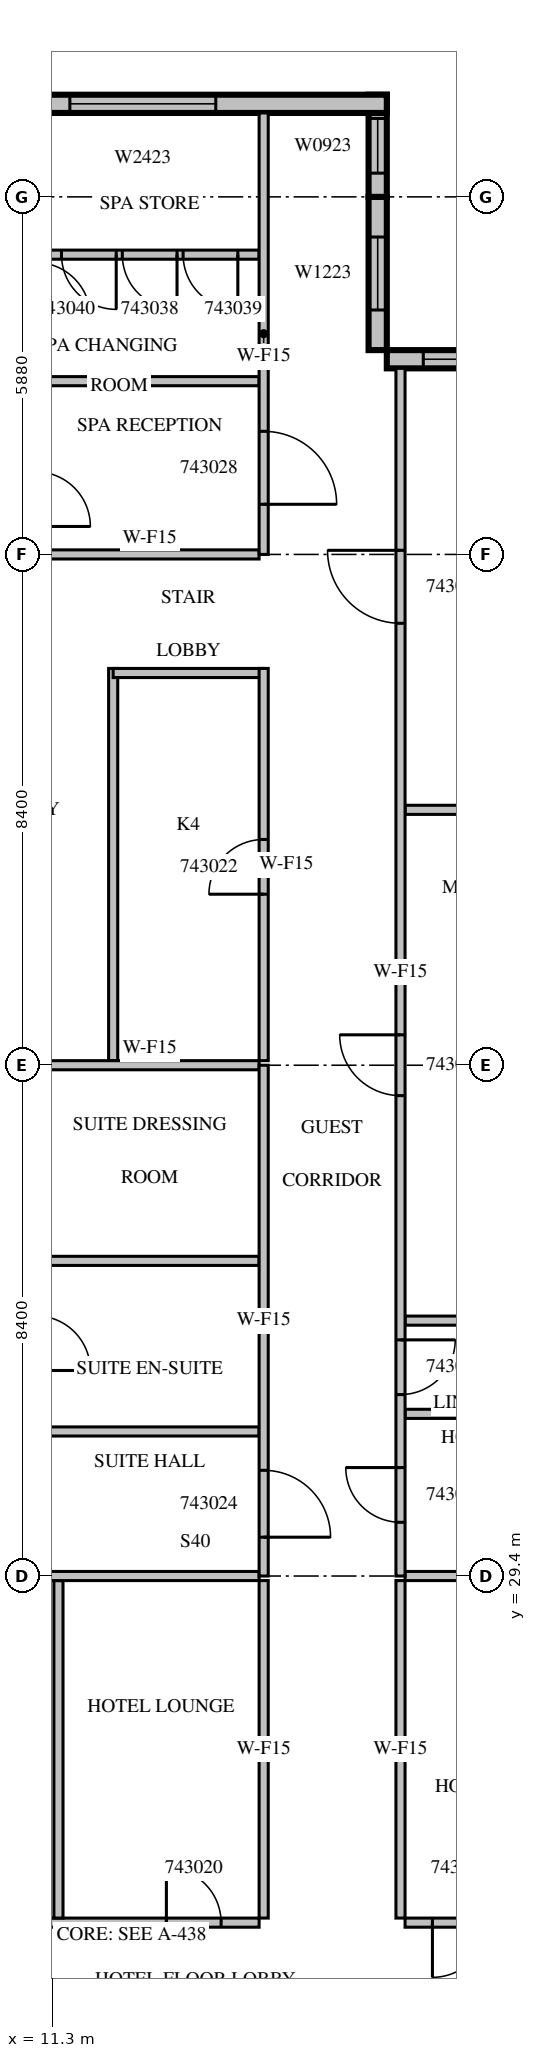
"""IFC4 building model, lengths in metres.
Left out: names, types, materials, properties, quantities, classifications, styles, units other than length and angle.
Written with IfcOpenShell. Run it as: python <this file> out.ifc"""

import sys

from ifc_helpers import new_model, si_unit, direction, frame, frame_2d, origin, place, context, subcontext, project, spatial, rectangle, extrude, source, transform, mapped, element, fill, save


model = new_model("IFC4")
c1 = context("Model", 3, precision=1e-05, world=origin(), true_north=direction((0.0, 1.0)))
c2 = subcontext(c1, "Body", "Model", "MODEL_VIEW")
j1 = project(units=[si_unit("LENGTHUNIT", "METRE"), si_unit("PLANEANGLEUNIT", "RADIAN")], contexts=[c1])
p1 = place(None, origin())
s1 = spatial("IfcSite", under=j1, at=p1, CompositionType="ELEMENT")
p2 = place(p1, origin())
s2 = spatial("IfcBuilding", under=s1, at=p2, CompositionType="ELEMENT")
p3 = place(p2, frame((0.0, 0.0, 196.8)))
s3 = spatial("IfcBuildingStorey", under=s2, at=p3, CompositionType="ELEMENT", Elevation=196.8)
m1 = source(origin(), c2, "Body", "SweptSolid", [
    extrude(rectangle(XDim=4.2, YDim=0.3, at=frame_2d((2.1, 0.0))), origin(), (0.0, 0.0, 1.0), 3.4),
])
p4 = place(p3, frame((21.0, 49.41, 0.0), z_axis=(0.0, 0.0, 1.0), x_axis=(-1.0, 0.0, 0.0)))
e1 = element("IfcWall", 1, at=p4, inside=s3, PredefinedType="STANDARD", context=c2, shape_type="MappedRepresentation", body=[
    mapped(m1, transform((0.0, 0.0, 0.0), scale=1.0)),
])
m2 = source(origin(), c2, "Body", "SweptSolid", [
    extrude(rectangle(XDim=3.0, YDim=2.3, at=frame_2d((1.5, 1.15))), frame((0.0, 0.16, 0.0), z_axis=(0.0, -1.0, 0.0), x_axis=(1.0, 0.0, 0.0)), (0.0, 0.0, 1.0), 0.32),
])
p5 = place(p4, frame((0.6, 0.0, 0.6)))
e2 = element("IfcOpeningElement", 2, at=p5, cuts=e1, PredefinedType="OPENING", context=c2, shape_type="MappedRepresentation", body=[
    mapped(m2, transform((0.0, 0.0, 0.0), scale=1.0)),
])
m3 = source(origin(), c2, "Body", "SweptSolid", [
    extrude(rectangle(XDim=2.52, YDim=0.3, at=frame_2d((1.26, 0.0))), origin(), (0.0, 0.0, 1.0), 3.4),
])
p6 = place(p3, frame((16.65, 49.56, 0.0), z_axis=(0.0, 0.0, 1.0), x_axis=(0.0, 1.0, 0.0)))
e3 = element("IfcWall", 3, at=p6, inside=s3, PredefinedType="STANDARD", context=c2, shape_type="MappedRepresentation", body=[
    mapped(m3, transform((0.0, 0.0, 0.0), scale=1.0)),
])
m4 = source(origin(), c2, "Body", "SweptSolid", [
    extrude(rectangle(XDim=1.2, YDim=2.3, at=frame_2d((0.6, 1.15))), frame((0.0, 0.16, 0.0), z_axis=(0.0, -1.0, 0.0), x_axis=(1.0, 0.0, 0.0)), (0.0, 0.0, 1.0), 0.32),
])
p7 = place(p6, frame((0.66, 0.0, 0.6)))
e4 = element("IfcOpeningElement", 4, at=p7, cuts=e3, PredefinedType="OPENING", context=c2, shape_type="MappedRepresentation", body=[
    mapped(m4, transform((0.0, 0.0, 0.0), scale=1.0)),
])
m5 = source(origin(), c2, "Body", "SweptSolid", [
    extrude(rectangle(XDim=1.68, YDim=0.3, at=frame_2d((0.84, 0.0))), origin(), (0.0, 0.0, 1.0), 3.4),
])
p8 = place(p3, frame((16.65, 52.08, 0.0), z_axis=(0.0, 0.0, 1.0), x_axis=(0.0, 1.0, 0.0)))
e5 = element("IfcWall", 5, at=p8, inside=s3, PredefinedType="STANDARD", context=c2, shape_type="MappedRepresentation", body=[
    mapped(m5, transform((0.0, 0.0, 0.0), scale=1.0)),
])
m6 = source(origin(), c2, "Body", "SweptSolid", [
    extrude(rectangle(XDim=0.9, YDim=2.3, at=frame_2d((0.45, 1.15))), frame((0.0, 0.16, 0.0), z_axis=(0.0, -1.0, 0.0), x_axis=(1.0, 0.0, 0.0)), (0.0, 0.0, 1.0), 0.32),
])
p9 = place(p8, frame((0.39, 0.0, 0.6)))
e6 = element("IfcOpeningElement", 6, at=p9, cuts=e5, PredefinedType="OPENING", context=c2, shape_type="MappedRepresentation", body=[
    mapped(m6, transform((0.0, 0.0, 0.0), scale=1.0)),
])
m7 = source(origin(), c2, "Body", "SweptSolid", [
    extrude(rectangle(XDim=10.5, YDim=0.3, at=frame_2d((5.25, 0.0))), origin(), (0.0, 0.0, 1.0), 3.4),
])
p10 = place(p3, frame((16.8, 53.61, 0.0), z_axis=(0.0, 0.0, 1.0), x_axis=(-1.0, 0.0, 0.0)))
e7 = element("IfcWall", 7, at=p10, inside=s3, PredefinedType="STANDARD", context=c2, shape_type="MappedRepresentation", body=[
    mapped(m7, transform((0.0, 0.0, 0.0), scale=1.0)),
])
m8 = source(origin(), c2, "Body", "SweptSolid", [
    extrude(rectangle(XDim=1.8, YDim=2.3, at=frame_2d((0.9, 1.15))), frame((0.0, 0.16, 0.0), z_axis=(0.0, -1.0, 0.0), x_axis=(1.0, 0.0, 0.0)), (0.0, 0.0, 1.0), 0.32),
])
p11 = place(p10, frame((8.025, 0.0, 0.6)))
e8 = element("IfcOpeningElement", 8, at=p11, cuts=e7, PredefinedType="OPENING", context=c2, shape_type="MappedRepresentation", body=[
    mapped(m8, transform((0.0, 0.0, 0.0), scale=1.0)),
])
m9 = source(origin(), c2, "Body", "SweptSolid", [
    extrude(rectangle(XDim=2.4, YDim=2.3, at=frame_2d((1.2, 1.15))), frame((0.0, 0.16, 0.0), z_axis=(0.0, -1.0, 0.0), x_axis=(1.0, 0.0, 0.0)), (0.0, 0.0, 1.0), 0.32),
])
p12 = place(p10, frame((2.812, 0.0, 0.6)))
e9 = element("IfcOpeningElement", 9, at=p12, cuts=e7, PredefinedType="OPENING", context=c2, shape_type="MappedRepresentation", body=[
    mapped(m9, transform((0.0, 0.0, 0.0), scale=1.0)),
])
p13 = place(p3, frame((6.505, 23.7, 0.0), z_axis=(0.0, 0.0, 1.0), x_axis=(1.0, 0.0, 0.0)))
e10 = element("IfcWall", 10, at=p13, inside=s3, PredefinedType="PARTITIONING", context=c2, shape_type="SweptSolid", body=[
    extrude(rectangle(XDim=8.195, YDim=0.15, at=frame_2d((4.098, 0.0))), origin(), (0.0, 0.0, 1.0), 3.4),
])
m10 = source(origin(), c2, "Body", "SweptSolid", [
    extrude(rectangle(XDim=0.9, YDim=2.1, at=frame_2d((0.45, 1.05))), frame((0.0, 0.085, 0.0), z_axis=(0.0, -1.0, 0.0), x_axis=(1.0, 0.0, 0.0)), (0.0, 0.0, 1.0), 0.17),
])
p14 = place(p13, frame((1.745, 0.0, 0.0)))
e11 = element("IfcOpeningElement", 11, at=p14, cuts=e10, PredefinedType="OPENING", context=c2, shape_type="MappedRepresentation", body=[
    mapped(m10, transform((0.0, 0.0, 0.0), scale=1.0)),
])
p15 = place(p13, frame((6.67, 0.0, 0.0)))
e12 = element("IfcOpeningElement", 12, at=p15, cuts=e10, PredefinedType="OPENING", context=c2, shape_type="MappedRepresentation", body=[
    mapped(m10, transform((0.0, 0.0, 0.0), scale=1.0)),
])
m11 = source(origin(), c2, "Body", "SweptSolid", [
    extrude(rectangle(XDim=3.6, YDim=0.15, at=frame_2d((1.8, 0.0))), origin(), (0.0, 0.0, 1.0), 3.4),
])
p16 = place(p3, frame((17.1, 23.7, 0.0), z_axis=(0.0, 0.0, 1.0), x_axis=(1.0, 0.0, 0.0)))
e13 = element("IfcWall", 13, at=p16, inside=s3, PredefinedType="PARTITIONING", context=c2, shape_type="MappedRepresentation", body=[
    mapped(m11, transform((0.0, 0.0, 0.0), scale=1.0)),
])
p17 = place(p16, frame((0.45, 0.0, 0.0)))
e14 = element("IfcOpeningElement", 14, at=p17, cuts=e13, PredefinedType="OPENING", context=c2, shape_type="MappedRepresentation", body=[
    mapped(m10, transform((0.0, 0.0, 0.0), scale=1.0)),
])
m12 = source(origin(), c2, "Body", "SweptSolid", [
    extrude(rectangle(XDim=5.55, YDim=0.15, at=frame_2d((2.775, 0.0))), origin(), (0.0, 0.0, 1.0), 3.4),
])
for number, where, z_axis, x_axis in (
    (15, (11.4, 23.775, 0.0), (0.0, 0.0, 1.0), (0.0, 1.0, 0.0)),
    (16, (14.775, 23.775, 0.0), (0.0, 0.0, 1.0), (0.0, 1.0, 0.0)),
    (17, (17.025, 29.325, 0.0), (0.0, 0.0, 1.0), (0.0, -1.0, 0.0)),
):
    element("IfcWall", number, at=place(p3, frame(where, z_axis=z_axis, x_axis=x_axis)), inside=s3, PredefinedType="PARTITIONING", context=c2, shape_type="MappedRepresentation", body=[
        mapped(m12, transform((0.0, 0.0, 0.0), scale=1.0)),
    ])
m13 = source(origin(), c2, "Body", "SweptSolid", [
    extrude(rectangle(XDim=3.751, YDim=0.15, at=frame_2d((1.875, 0.0))), origin(), (0.0, 0.0, 1.0), 3.4),
])
p18 = place(p3, frame((14.7, 29.4, 0.0), z_axis=(0.0, 0.0, 1.0), x_axis=(-1.0, 0.0, 0.0)))
e18 = element("IfcWall", 18, at=p18, inside=s3, PredefinedType="PARTITIONING", context=c2, shape_type="MappedRepresentation", body=[
    mapped(m13, transform((0.0, 0.0, 0.0), scale=1.0)),
])
m14 = source(origin(), c2, "Body", "SweptSolid", [
    extrude(rectangle(XDim=3.001, YDim=0.15, at=frame_2d((1.5, 0.0))), origin(), (0.0, 0.0, 1.0), 3.4),
])
p19 = place(p3, frame((20.101, 29.4, 0.0), z_axis=(0.0, 0.0, 1.0), x_axis=(-1.0, 0.0, 0.0)))
e19 = element("IfcWall", 19, at=p19, inside=s3, PredefinedType="PARTITIONING", context=c2, shape_type="MappedRepresentation", body=[
    mapped(m14, transform((0.0, 0.0, 0.0), scale=1.0)),
])
m15 = source(origin(), c2, "Body", "SweptSolid", [
    extrude(rectangle(XDim=6.45, YDim=0.15, at=frame_2d((3.225, 0.0))), origin(), (0.0, 0.0, 1.0), 3.4),
])
p20 = place(p3, frame((12.3, 44.325, 0.0), z_axis=(0.0, 0.0, 1.0), x_axis=(0.0, -1.0, 0.0)))
e20 = element("IfcWall", 20, at=p20, inside=s3, PredefinedType="PARTITIONING", context=c2, shape_type="MappedRepresentation", body=[
    mapped(m15, transform((0.0, 0.0, 0.0), scale=1.0)),
])
m16 = source(origin(), c2, "Body", "SweptSolid", [
    extrude(rectangle(XDim=2.475, YDim=0.15, at=frame_2d((1.238, 0.0))), origin(), (0.0, 0.0, 1.0), 3.4),
])
p21 = place(p3, frame((14.775, 44.25, 0.0), z_axis=(0.0, 0.0, 1.0), x_axis=(-1.0, 0.0, 0.0)))
e21 = element("IfcWall", 21, at=p21, inside=s3, PredefinedType="PARTITIONING", context=c2, shape_type="MappedRepresentation", body=[
    mapped(m16, transform((0.0, 0.0, 0.0), scale=1.0)),
])
p22 = place(p3, frame((14.775, 37.875, 0.0), z_axis=(0.0, 0.0, 1.0), x_axis=(0.0, 1.0, 0.0)))
e22 = element("IfcWall", 22, at=p22, inside=s3, PredefinedType="PARTITIONING", context=c2, shape_type="MappedRepresentation", body=[
    mapped(m15, transform((0.0, 0.0, 0.0), scale=1.0)),
])
p23 = place(p22, frame((2.737, 0.0, 0.0)))
e23 = element("IfcOpeningElement", 23, at=p23, cuts=e22, PredefinedType="OPENING", context=c2, shape_type="MappedRepresentation", body=[
    mapped(m10, transform((0.0, 0.0, 0.0), scale=1.0)),
])
for number, where, z_axis, x_axis in (
    (24, (14.7, 31.777, 0.0), (0.0, 0.0, 1.0), (-1.0, 0.0, 0.0)),
    (25, (14.7, 34.583, 0.0), (0.0, 0.0, 1.0), (-1.0, 0.0, 0.0)),
    (26, (14.7, 37.8, 0.0), (0.0, 0.0, 1.0), (-1.0, 0.0, 0.0)),
    (27, (14.7, 49.049, 0.0), (0.0, 0.0, 1.0), (-1.0, 0.0, 0.0)),
):
    element("IfcWall", number, at=place(p3, frame(where, z_axis=z_axis, x_axis=x_axis)), inside=s3, PredefinedType="PARTITIONING", context=c2, shape_type="MappedRepresentation", body=[
        mapped(m11, transform((0.0, 0.0, 0.0), scale=1.0)),
    ])
p24 = place(p3, frame((14.7, 51.13, 0.0), z_axis=(0.0, 0.0, 1.0), x_axis=(-1.0, 0.0, 0.0)))
e28 = element("IfcWall", 28, at=p24, inside=s3, PredefinedType="PARTITIONING", context=c2, shape_type="MappedRepresentation", body=[
    mapped(m11, transform((0.0, 0.0, 0.0), scale=1.0)),
])
p25 = place(p24, frame((1.35, 0.0, 0.0)))
e29 = element("IfcOpeningElement", 29, at=p25, cuts=e28, PredefinedType="OPENING", context=c2, shape_type="MappedRepresentation", body=[
    mapped(m10, transform((0.0, 0.0, 0.0), scale=1.0)),
])
p26 = place(p24, frame((0.35, 0.0, 0.0)))
e30 = element("IfcOpeningElement", 30, at=p26, cuts=e28, PredefinedType="OPENING", context=c2, shape_type="MappedRepresentation", body=[
    mapped(m10, transform((0.0, 0.0, 0.0), scale=1.0)),
])
p27 = place(p24, frame((2.35, 0.0, 0.0)))
e31 = element("IfcOpeningElement", 31, at=p27, cuts=e28, PredefinedType="OPENING", context=c2, shape_type="MappedRepresentation", body=[
    mapped(m10, transform((0.0, 0.0, 0.0), scale=1.0)),
])
for number, where, z_axis, x_axis in (
    (32, (14.7, 46.2, 0.0), (0.0, 0.0, 1.0), (-1.0, 0.0, 0.0)),
    (33, (17.1, 32.067, 0.0), (0.0, 0.0, 1.0), (1.0, 0.0, 0.0)),
    (34, (20.7, 33.6, 0.0), (0.0, 0.0, 1.0), (-1.0, 0.0, 0.0)),
    (35, (20.7, 42.0, 0.0), (0.0, 0.0, 1.0), (-1.0, 0.0, 0.0)),
):
    element("IfcWall", number, at=place(p3, frame(where, z_axis=z_axis, x_axis=x_axis)), inside=s3, PredefinedType="PARTITIONING", context=c2, shape_type="MappedRepresentation", body=[
        mapped(m11, transform((0.0, 0.0, 0.0), scale=1.0)),
    ])
m17 = source(origin(), c2, "Body", "SweptSolid", [
    extrude(rectangle(XDim=8.4, YDim=0.15, at=frame_2d((4.2, 0.0))), origin(), (0.0, 0.0, 1.0), 3.4),
])
p28 = place(p3, frame((14.775, 29.4, 0.0), z_axis=(0.0, 0.0, 1.0), x_axis=(0.0, 1.0, 0.0)))
e36 = element("IfcWall", 36, at=p28, inside=s3, PredefinedType="PARTITIONING", context=c2, shape_type="MappedRepresentation", body=[
    mapped(m17, transform((0.0, 0.0, 0.0), scale=1.0)),
])
m18 = source(origin(), c2, "Body", "SweptSolid", [
    extrude(rectangle(XDim=1.1, YDim=2.1, at=frame_2d((0.55, 1.05))), frame((0.0, 0.085, 0.0), z_axis=(0.0, -1.0, 0.0), x_axis=(1.0, 0.0, 0.0)), (0.0, 0.0, 1.0), 0.17),
])
p29 = place(p28, frame((0.638, 0.0, 0.0)))
e37 = element("IfcOpeningElement", 37, at=p29, cuts=e36, PredefinedType="OPENING", context=c2, shape_type="MappedRepresentation", body=[
    mapped(m18, transform((0.0, 0.0, 0.0), scale=1.0)),
])
m19 = source(origin(), c2, "Body", "SweptSolid", [
    extrude(rectangle(XDim=7.26, YDim=0.15, at=frame_2d((3.63, 0.0))), origin(), (0.0, 0.0, 1.0), 3.4),
])
p30 = place(p3, frame((14.775, 46.2, 0.0), z_axis=(0.0, 0.0, 1.0), x_axis=(0.0, 1.0, 0.0)))
e38 = element("IfcWall", 38, at=p30, inside=s3, PredefinedType="PARTITIONING", context=c2, shape_type="MappedRepresentation", body=[
    mapped(m19, transform((0.0, 0.0, 0.0), scale=1.0)),
])
m20 = source(origin(), c2, "Body", "SweptSolid", [
    extrude(rectangle(XDim=1.2, YDim=2.1, at=frame_2d((0.6, 1.05))), frame((0.0, 0.085, 0.0), z_axis=(0.0, -1.0, 0.0), x_axis=(1.0, 0.0, 0.0)), (0.0, 0.0, 1.0), 0.17),
])
p31 = place(p30, frame((0.825, 0.0, 0.0)))
e39 = element("IfcOpeningElement", 39, at=p31, cuts=e38, PredefinedType="OPENING", context=c2, shape_type="MappedRepresentation", body=[
    mapped(m20, transform((0.0, 0.0, 0.0), scale=1.0)),
])
m21 = source(origin(), c2, "Body", "SweptSolid", [
    extrude(rectangle(XDim=19.86, YDim=0.15, at=frame_2d((9.93, 0.0))), origin(), (0.0, 0.0, 1.0), 3.4),
])
p32 = place(p3, frame((17.025, 49.26, 0.0), z_axis=(0.0, 0.0, 1.0), x_axis=(0.0, -1.0, 0.0)))
e40 = element("IfcWall", 40, at=p32, inside=s3, PredefinedType="PARTITIONING", context=c2, shape_type="MappedRepresentation", body=[
    mapped(m21, transform((0.0, 0.0, 0.0), scale=1.0)),
])
p33 = place(p32, frame((18.076, 0.0, 0.0)))
e41 = element("IfcOpeningElement", 41, at=p33, cuts=e40, PredefinedType="OPENING", context=c2, shape_type="MappedRepresentation", body=[
    mapped(m10, transform((0.0, 0.0, 0.0), scale=1.0)),
])
p34 = place(p32, frame((15.976, 0.0, 0.0)))
e42 = element("IfcOpeningElement", 42, at=p34, cuts=e40, PredefinedType="OPENING", context=c2, shape_type="MappedRepresentation", body=[
    mapped(m10, transform((0.0, 0.0, 0.0), scale=1.0)),
])
m22 = source(origin(), c2, "Body", "SweptSolid", [
    extrude(rectangle(XDim=1.0, YDim=2.1, at=frame_2d((0.5, 1.05))), frame((0.0, 0.085, 0.0), z_axis=(0.0, -1.0, 0.0), x_axis=(1.0, 0.0, 0.0)), (0.0, 0.0, 1.0), 0.17),
])
p35 = place(p32, frame((10.96, 0.0, 0.0)))
e43 = element("IfcOpeningElement", 43, at=p35, cuts=e40, PredefinedType="OPENING", context=c2, shape_type="MappedRepresentation", body=[
    mapped(m22, transform((0.0, 0.0, 0.0), scale=1.0)),
])
p36 = place(p32, frame((2.993, 0.0, 0.0)))
e44 = element("IfcOpeningElement", 44, at=p36, cuts=e40, PredefinedType="OPENING", context=c2, shape_type="MappedRepresentation", body=[
    mapped(m20, transform((0.0, 0.0, 0.0), scale=1.0)),
])
m23 = source(origin(), c2, "Body", "SweptSolid", [
    extrude(rectangle(XDim=3.0, YDim=2.3, at=frame_2d((1.5, 1.15))), frame((0.0, 0.03, 0.0), z_axis=(0.0, -1.0, 0.0), x_axis=(1.0, 0.0, 0.0)), (0.0, 0.0, 1.0), 0.06),
])
p37 = place(p5, origin())
e45 = element("IfcWindow", 45, at=p37, inside=s3, PartitioningType="SINGLE_PANEL", PredefinedType="WINDOW", context=c2, shape_type="MappedRepresentation", body=[
    mapped(m23, transform((0.0, 0.0, 0.0), scale=1.0)),
])
fill(e2, e45)
m24 = source(origin(), c2, "Body", "SweptSolid", [
    extrude(rectangle(XDim=1.2, YDim=2.3, at=frame_2d((0.6, 1.15))), frame((0.0, 0.03, 0.0), z_axis=(0.0, -1.0, 0.0), x_axis=(1.0, 0.0, 0.0)), (0.0, 0.0, 1.0), 0.06),
])
p38 = place(p7, origin())
e46 = element("IfcWindow", 46, at=p38, inside=s3, PartitioningType="SINGLE_PANEL", PredefinedType="WINDOW", context=c2, shape_type="MappedRepresentation", body=[
    mapped(m24, transform((0.0, 0.0, 0.0), scale=1.0)),
])
fill(e4, e46)
m25 = source(origin(), c2, "Body", "SweptSolid", [
    extrude(rectangle(XDim=0.9, YDim=2.3, at=frame_2d((0.45, 1.15))), frame((0.0, 0.03, 0.0), z_axis=(0.0, -1.0, 0.0), x_axis=(1.0, 0.0, 0.0)), (0.0, 0.0, 1.0), 0.06),
])
p39 = place(p9, origin())
e47 = element("IfcWindow", 47, at=p39, inside=s3, PartitioningType="SINGLE_PANEL", PredefinedType="WINDOW", context=c2, shape_type="MappedRepresentation", body=[
    mapped(m25, transform((0.0, 0.0, 0.0), scale=1.0)),
])
fill(e6, e47)
m26 = source(origin(), c2, "Body", "SweptSolid", [
    extrude(rectangle(XDim=2.4, YDim=2.3, at=frame_2d((1.2, 1.15))), frame((0.0, 0.03, 0.0), z_axis=(0.0, -1.0, 0.0), x_axis=(1.0, 0.0, 0.0)), (0.0, 0.0, 1.0), 0.06),
])
p40 = place(p12, origin())
e48 = element("IfcWindow", 48, at=p40, inside=s3, PartitioningType="SINGLE_PANEL", PredefinedType="WINDOW", context=c2, shape_type="MappedRepresentation", body=[
    mapped(m26, transform((0.0, 0.0, 0.0), scale=1.0)),
])
fill(e9, e48)
m27 = source(origin(), c2, "Body", "SweptSolid", [
    extrude(rectangle(XDim=0.9, YDim=2.1, at=frame_2d((0.45, 1.05))), frame((0.0, 0.025, 0.0), z_axis=(0.0, -1.0, 0.0), x_axis=(1.0, 0.0, 0.0)), (0.0, 0.0, 1.0), 0.05),
])
p41 = place(p15, origin())
e49 = element("IfcDoor", 49, at=p41, inside=s3, OperationType="SINGLE_SWING_LEFT", PredefinedType="DOOR", context=c2, shape_type="MappedRepresentation", body=[
    mapped(m27, transform((0.0, 0.0, 0.0), scale=1.0)),
])
fill(e12, e49)
p42 = place(p17, origin())
e50 = element("IfcDoor", 50, at=p42, inside=s3, OperationType="SINGLE_SWING_RIGHT", PredefinedType="DOOR", context=c2, shape_type="MappedRepresentation", body=[
    mapped(m27, transform((0.0, 0.0, 0.0), scale=1.0)),
])
fill(e14, e50)
p43 = place(p23, origin())
e51 = element("IfcDoor", 51, at=p43, inside=s3, OperationType="SINGLE_SWING_LEFT", PredefinedType="DOOR", context=c2, shape_type="MappedRepresentation", body=[
    mapped(m27, transform((0.0, 0.0, 0.0), scale=1.0)),
])
fill(e23, e51)
m28 = source(origin(), c2, "Body", "SweptSolid", [
    extrude(rectangle(XDim=1.1, YDim=2.1, at=frame_2d((0.55, 1.05))), frame((0.0, 0.025, 0.0), z_axis=(0.0, -1.0, 0.0), x_axis=(1.0, 0.0, 0.0)), (0.0, 0.0, 1.0), 0.05),
])
p44 = place(p29, origin())
e52 = element("IfcDoor", 52, at=p44, inside=s3, OperationType="SINGLE_SWING_RIGHT", PredefinedType="DOOR", context=c2, shape_type="MappedRepresentation", body=[
    mapped(m28, transform((0.0, 0.0, 0.0), scale=1.0)),
])
fill(e37, e52)
m29 = source(origin(), c2, "Body", "SweptSolid", [
    extrude(rectangle(XDim=1.2, YDim=2.1, at=frame_2d((0.6, 1.05))), frame((0.0, 0.025, 0.0), z_axis=(0.0, -1.0, 0.0), x_axis=(1.0, 0.0, 0.0)), (0.0, 0.0, 1.0), 0.05),
])
p45 = place(p31, origin())
e53 = element("IfcDoor", 53, at=p45, inside=s3, OperationType="SINGLE_SWING_RIGHT", PredefinedType="DOOR", context=c2, shape_type="MappedRepresentation", body=[
    mapped(m29, transform((0.0, 0.0, 0.0), scale=1.0)),
])
fill(e39, e53)
p46 = place(p33, origin())
e54 = element("IfcDoor", 54, at=p46, inside=s3, OperationType="SINGLE_SWING_RIGHT", PredefinedType="DOOR", context=c2, shape_type="MappedRepresentation", body=[
    mapped(m27, transform((0.0, 0.0, 0.0), scale=1.0)),
])
fill(e41, e54)
p47 = place(p34, origin())
e55 = element("IfcDoor", 55, at=p47, inside=s3, OperationType="SINGLE_SWING_LEFT", PredefinedType="DOOR", context=c2, shape_type="MappedRepresentation", body=[
    mapped(m27, transform((0.0, 0.0, 0.0), scale=1.0)),
])
fill(e42, e55)
m30 = source(origin(), c2, "Body", "SweptSolid", [
    extrude(rectangle(XDim=1.0, YDim=2.1, at=frame_2d((0.5, 1.05))), frame((0.0, 0.025, 0.0), z_axis=(0.0, -1.0, 0.0), x_axis=(1.0, 0.0, 0.0)), (0.0, 0.0, 1.0), 0.05),
])
p48 = place(p35, origin())
e56 = element("IfcDoor", 56, at=p48, inside=s3, OperationType="SINGLE_SWING_RIGHT", PredefinedType="DOOR", context=c2, shape_type="MappedRepresentation", body=[
    mapped(m30, transform((0.0, 0.0, 0.0), scale=1.0)),
])
fill(e43, e56)
p49 = place(p36, origin())
e57 = element("IfcDoor", 57, at=p49, inside=s3, OperationType="SINGLE_SWING_RIGHT", PredefinedType="DOOR", context=c2, shape_type="MappedRepresentation", body=[
    mapped(m29, transform((0.0, 0.0, 0.0), scale=1.0)),
])
fill(e44, e57)
p50 = place(p25, origin())
e58 = element("IfcDoor", 58, at=p50, inside=s3, OperationType="SINGLE_SWING_LEFT", PredefinedType="DOOR", context=c2, shape_type="MappedRepresentation", body=[
    mapped(m27, transform((0.0, 0.0, 0.0), scale=1.0)),
])
fill(e29, e58)
p51 = place(p26, origin())
e59 = element("IfcDoor", 59, at=p51, inside=s3, OperationType="SINGLE_SWING_LEFT", PredefinedType="DOOR", context=c2, shape_type="MappedRepresentation", body=[
    mapped(m27, transform((0.0, 0.0, 0.0), scale=1.0)),
])
fill(e30, e59)
p52 = place(p27, origin())
e60 = element("IfcDoor", 60, at=p52, inside=s3, OperationType="SINGLE_SWING_LEFT", PredefinedType="DOOR", context=c2, shape_type="MappedRepresentation", body=[
    mapped(m27, transform((0.0, 0.0, 0.0), scale=1.0)),
])
fill(e31, e60)
save(model, sys.argv[1])
